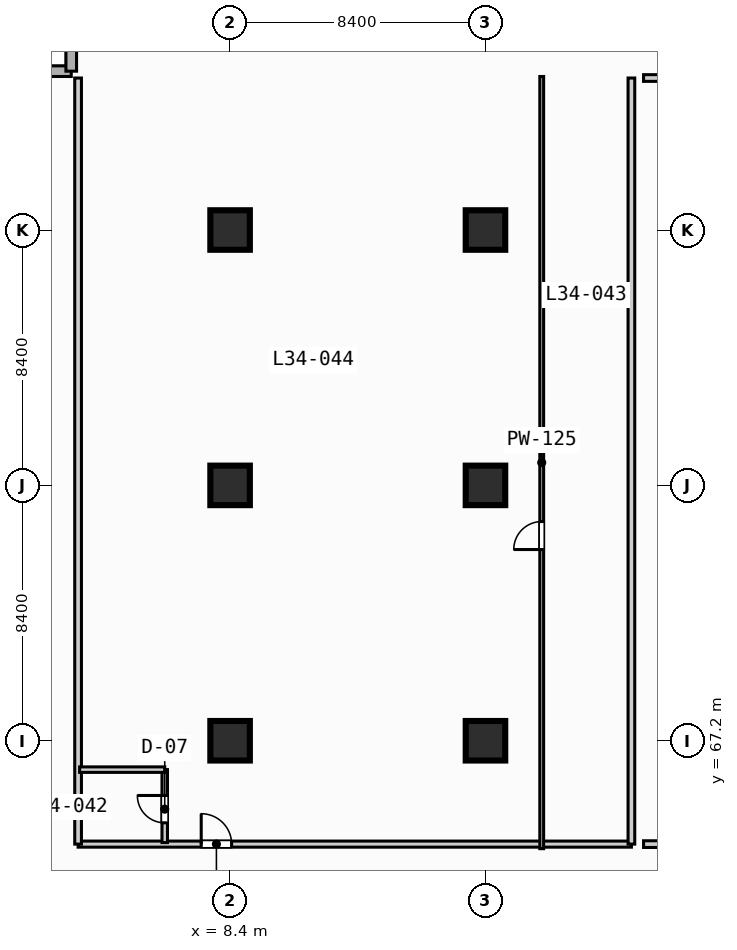
"""IFC4 building model, lengths in metres.
Left out: names, types, materials, properties, quantities, classifications, styles, units other than length and angle.
Written with IfcOpenShell. Run it as: python <this file> out.ifc"""

import sys

from ifc_helpers import new_model, si_unit, direction, frame, frame_2d, origin, origin_2d, place, context, subcontext, project, spatial, rectangle, extrude, element, fill, save


model = new_model("IFC4")
c1 = context("Model", 3, precision=1e-05, world=origin(), true_north=direction((0.0, 1.0)))
c2 = subcontext(c1, "Body", "Model", "MODEL_VIEW")
j1 = project(units=[si_unit("LENGTHUNIT", "METRE"), si_unit("PLANEANGLEUNIT", "RADIAN")], contexts=[c1])
p1 = place(None, origin())
s1 = spatial("IfcSite", under=j1, at=p1, CompositionType="ELEMENT")
p2 = place(p1, origin())
s2 = spatial("IfcBuilding", under=s1, at=p2, CompositionType="ELEMENT")
p3 = place(p2, frame((0.0, 0.0, 141.8)))
s3 = spatial("IfcBuildingStorey", under=s2, at=p3, CompositionType="ELEMENT", Elevation=141.8)
for number, where, z_axis, x_axis in (
    (1, (8.4, 67.2, 0.0), (0.0, 0.0, 1.0), (1.0, 0.0, 0.0)),
    (2, (8.4, 75.6, 0.0), (0.0, 0.0, 1.0), (1.0, 0.0, 0.0)),
    (3, (8.4, 84.0, 0.0), (0.0, 0.0, 1.0), (1.0, 0.0, 0.0)),
    (4, (16.8, 67.2, 0.0), (0.0, 0.0, 1.0), (1.0, 0.0, 0.0)),
    (5, (16.8, 75.6, 0.0), (0.0, 0.0, 1.0), (1.0, 0.0, 0.0)),
    (6, (16.8, 84.0, 0.0), (0.0, 0.0, 1.0), (1.0, 0.0, 0.0)),
):
    element("IfcColumn", number, at=place(p3, frame(where, z_axis=z_axis, x_axis=x_axis)), inside=s3, PredefinedType="COLUMN", context=c2, shape_type="SweptSolid", body=[
        extrude(rectangle(XDim=1.3, YDim=1.3, at=origin_2d()), origin(), (0.0, 0.0, 1.0), 3.8),
    ])
for number, where, z_axis, x_axis in (
    (7, (0.175, 89.225, 0.0), (0.0, 0.0, 1.0), (1.0, 0.0, 0.0)),
    (8, (3.175, 89.225, 0.0), (0.0, 0.0, 1.0), (0.0, 1.0, 0.0)),
):
    element("IfcWall", number, at=place(p3, frame(where, z_axis=z_axis, x_axis=x_axis)), inside=s3, PredefinedType="STANDARD", context=c2, shape_type="SweptSolid", body=[
        extrude(rectangle(XDim=3.0, YDim=0.35, at=frame_2d((1.5, 0.0))), origin(), (0.0, 0.0, 1.0), 3.55),
    ])
p4 = place(p3, frame((3.4, 63.8, 0.0), z_axis=(0.0, 0.0, 1.0), x_axis=(1.0, 0.0, 0.0)))
e9 = element("IfcWall", 9, at=p4, inside=s3, PredefinedType="PARTITIONING", context=c2, shape_type="SweptSolid", body=[
    extrude(rectangle(XDim=18.2, YDim=0.2, at=frame_2d((9.1, 0.0))), origin(), (0.0, 0.0, 1.0), 3.55),
])
p5 = place(p4, frame((4.05, 0.0, 0.0)))
e10 = element("IfcOpeningElement", 10, at=p5, cuts=e9, PredefinedType="OPENING", context=c2, shape_type="SweptSolid", body=[
    extrude(rectangle(XDim=1.0, YDim=2.15, at=frame_2d((0.5, 1.075))), frame((0.0, 0.11, 0.0), z_axis=(0.0, -1.0, 0.0), x_axis=(1.0, 0.0, 0.0)), (0.0, 0.0, 1.0), 0.22),
])
for number, where, z_axis, x_axis in (
    (11, (21.6, 63.8, 0.0), (0.0, 0.0, 1.0), (0.0, 1.0, 0.0)),
    (12, (3.4, 63.8, 0.0), (0.0, 0.0, 1.0), (0.0, 1.0, 0.0)),
):
    element("IfcWall", number, at=place(p3, frame(where, z_axis=z_axis, x_axis=x_axis)), inside=s3, PredefinedType="PARTITIONING", context=c2, shape_type="SweptSolid", body=[
        extrude(rectangle(XDim=25.2, YDim=0.22, at=frame_2d((12.6, 0.0))), origin(), (0.0, 0.0, 1.0), 3.55),
    ])
p6 = place(p3, frame((6.25, 63.85, 0.0), z_axis=(0.0, 0.0, 1.0), x_axis=(0.0, 1.0, 0.0)))
e13 = element("IfcWall", 13, at=p6, inside=s3, PredefinedType="PLUMBINGWALL", context=c2, shape_type="SweptSolid", body=[
    extrude(rectangle(XDim=2.4, YDim=0.18, at=frame_2d((1.2, 0.0))), origin(), (0.0, 0.0, 1.0), 3.55),
])
p7 = place(p6, frame((0.65, 0.0, 0.0)))
e14 = element("IfcOpeningElement", 14, at=p7, cuts=e13, PredefinedType="OPENING", context=c2, shape_type="SweptSolid", body=[
    extrude(rectangle(XDim=0.9, YDim=2.1, at=frame_2d((0.45, 1.05))), frame((0.0, 0.1, 0.0), z_axis=(0.0, -1.0, 0.0), x_axis=(1.0, 0.0, 0.0)), (0.0, 0.0, 1.0), 0.2),
])
p8 = place(p3, frame((3.45, 66.25, 0.0), z_axis=(0.0, 0.0, 1.0), x_axis=(1.0, 0.0, 0.0)))
e15 = element("IfcWall", 15, at=p8, inside=s3, PredefinedType="PLUMBINGWALL", context=c2, shape_type="SweptSolid", body=[
    extrude(rectangle(XDim=2.8, YDim=0.18, at=frame_2d((1.4, 0.0))), origin(), (0.0, 0.0, 1.0), 3.55),
])
p9 = place(p3, frame((18.65, 63.65, 0.0), z_axis=(0.0, 0.0, 1.0), x_axis=(0.0, 1.0, 0.0)))
e16 = element("IfcWall", 16, at=p9, inside=s3, PredefinedType="PARTITIONING", context=c2, shape_type="SweptSolid", body=[
    extrude(rectangle(XDim=25.4, YDim=0.125, at=frame_2d((12.7, 0.0))), origin(), (0.0, 0.0, 1.0), 3.55),
])
p10 = place(p9, frame((9.84, 0.0, 0.0)))
e17 = element("IfcOpeningElement", 17, at=p10, cuts=e16, PredefinedType="OPENING", context=c2, shape_type="SweptSolid", body=[
    extrude(rectangle(XDim=0.92, YDim=2.1, at=frame_2d((0.46, 1.05))), frame((0.0, 0.073, 0.0), z_axis=(0.0, -1.0, 0.0), x_axis=(1.0, 0.0, 0.0)), (0.0, 0.0, 1.0), 0.145),
])
p11 = place(p3, frame((22.0, 89.0, 0.0), z_axis=(0.0, 0.0, 1.0), x_axis=(1.0, 0.0, 0.0)))
e18 = element("IfcWall", 18, at=p11, inside=s3, PredefinedType="PARTITIONING", context=c2, shape_type="SweptSolid", body=[
    extrude(rectangle(XDim=11.3, YDim=0.22, at=frame_2d((5.65, 0.0))), origin(), (0.0, 0.0, 1.0), 3.55),
])
p12 = place(p3, frame((22.0, 63.8, 0.0), z_axis=(0.0, 0.0, 1.0), x_axis=(1.0, 0.0, 0.0)))
e19 = element("IfcWall", 19, at=p12, inside=s3, PredefinedType="PARTITIONING", context=c2, shape_type="SweptSolid", body=[
    extrude(rectangle(XDim=6.0, YDim=0.22, at=frame_2d((3.0, 0.0))), origin(), (0.0, 0.0, 1.0), 3.55),
])
p13 = place(p5, origin())
e20 = element("IfcDoor", 20, at=p13, inside=s3, OperationType="SINGLE_SWING_LEFT", PredefinedType="DOOR", context=c2, shape_type="SweptSolid", body=[
    extrude(rectangle(XDim=1.0, YDim=2.15, at=frame_2d((0.5, 1.075))), frame((0.0, 0.025, 0.0), z_axis=(0.0, -1.0, 0.0), x_axis=(1.0, 0.0, 0.0)), (0.0, 0.0, 1.0), 0.05),
])
fill(e10, e20)
p14 = place(p7, origin())
e21 = element("IfcDoor", 21, at=p14, inside=s3, OperationType="SINGLE_SWING_RIGHT", PredefinedType="DOOR", context=c2, shape_type="SweptSolid", body=[
    extrude(rectangle(XDim=0.9, YDim=2.1, at=frame_2d((0.45, 1.05))), frame((0.0, 0.025, 0.0), z_axis=(0.0, -1.0, 0.0), x_axis=(1.0, 0.0, 0.0)), (0.0, 0.0, 1.0), 0.05),
])
fill(e14, e21)
p15 = place(p10, origin())
e22 = element("IfcDoor", 22, at=p15, inside=s3, OperationType="SINGLE_SWING_LEFT", PredefinedType="DOOR", context=c2, shape_type="SweptSolid", body=[
    extrude(rectangle(XDim=0.92, YDim=2.1, at=frame_2d((0.46, 1.05))), frame((0.0, 0.025, 0.0), z_axis=(0.0, -1.0, 0.0), x_axis=(1.0, 0.0, 0.0)), (0.0, 0.0, 1.0), 0.05),
])
fill(e17, e22)
save(model, sys.argv[1])
